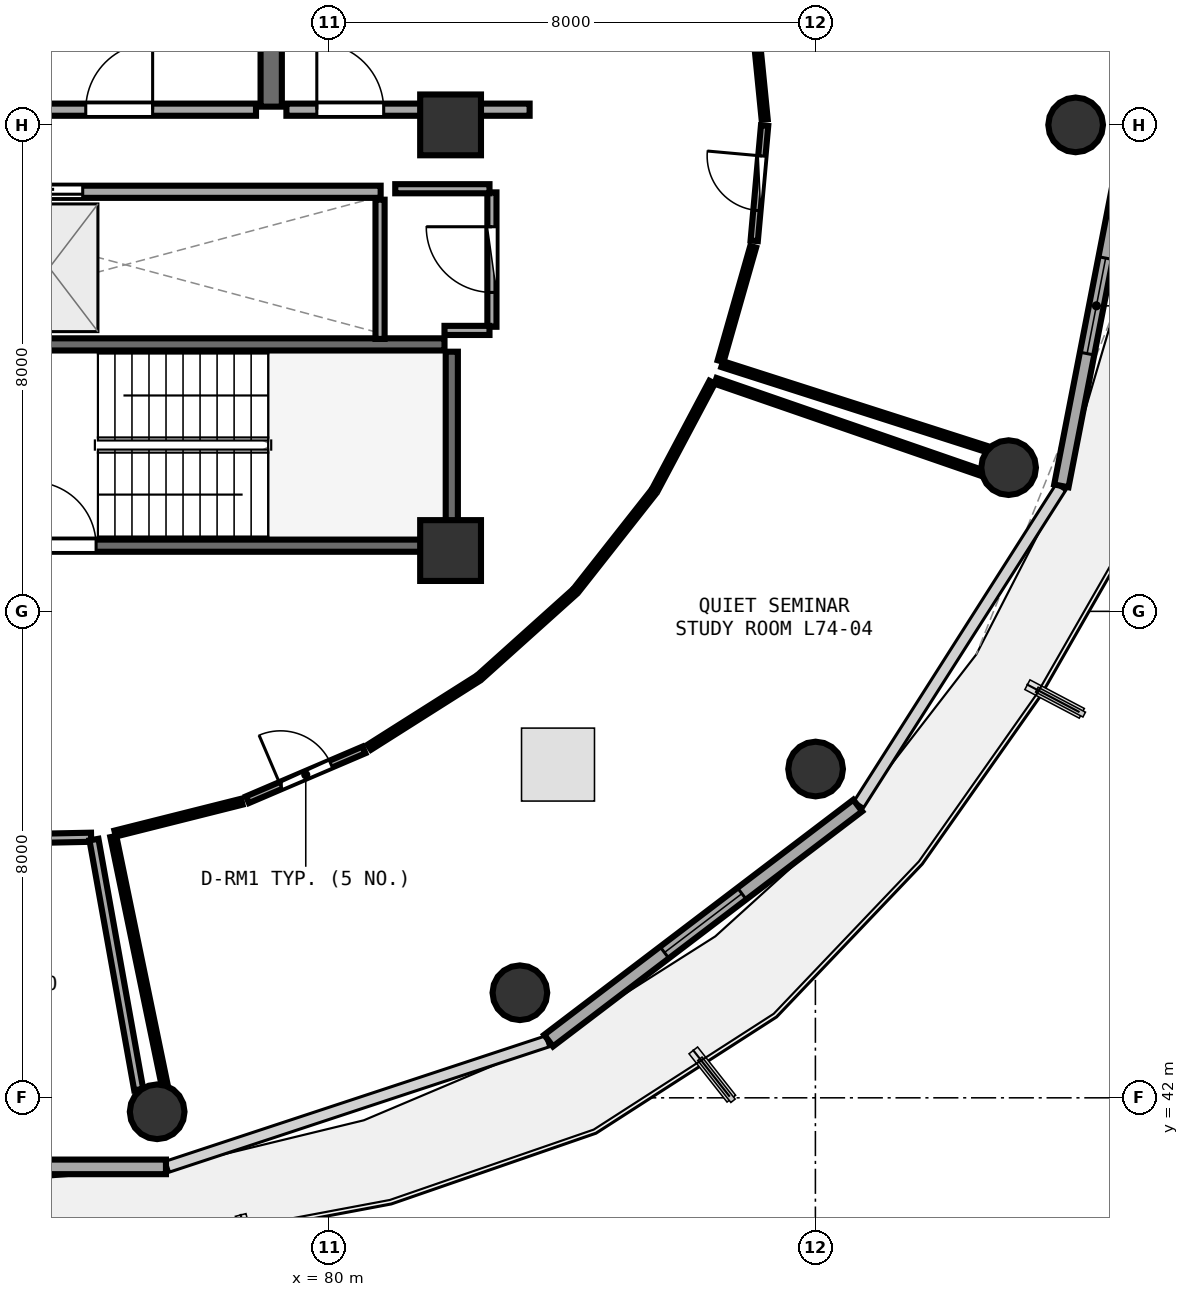
"""IFC4 building model, lengths in metres.
Left out: names, types, materials, properties, quantities, classifications, styles, units other than length and angle.
Written with IfcOpenShell. Run it as: python <this file> out.ifc"""

import sys

from ifc_helpers import new_model, si_unit, direction, frame, frame_2d, origin, origin_2d, place, context, subcontext, project, spatial, rectangle, circle, extrude, element, fill, save


model = new_model("IFC4")
c1 = context("Model", 3, precision=1e-05, world=origin(), true_north=direction((0.0, 1.0)))
c2 = subcontext(c1, "Body", "Model", "MODEL_VIEW")
j1 = project(units=[si_unit("LENGTHUNIT", "METRE"), si_unit("PLANEANGLEUNIT", "RADIAN")], contexts=[c1])
p1 = place(None, origin())
s1 = spatial("IfcSite", under=j1, at=p1, CompositionType="ELEMENT")
p2 = place(p1, origin())
s2 = spatial("IfcBuilding", under=s1, at=p2, CompositionType="ELEMENT")
p3 = place(p2, frame((0.0, 0.0, 289.95)))
s3 = spatial("IfcBuildingStorey", under=s2, at=p3, CompositionType="ELEMENT", Elevation=289.95)
for number, where, z_axis, x_axis in (
    (1, (82.0, 51.0, 0.0), (0.0, 0.0, 1.0), (1.0, 0.0, 0.0)),
    (2, (82.0, 58.0, 0.0), (0.0, 0.0, 1.0), (1.0, 0.0, 0.0)),
):
    element("IfcColumn", number, at=place(p3, frame(where, z_axis=z_axis, x_axis=x_axis)), inside=s3, PredefinedType="PILASTER", context=c2, shape_type="SweptSolid", body=[
        extrude(rectangle(XDim=1.0, YDim=1.0, at=origin_2d()), origin(), (0.0, 0.0, 1.0), 3.75),
    ])
for number, where, z_axis, x_axis in (
    (3, (92.28, 58.0, 0.0), (0.0, 0.0, 1.0), (1.0, 0.0, 0.0)),
    (4, (77.174, 41.771, 0.0), (0.0, 0.0, 1.0), (1.0, 0.0, 0.0)),
    (5, (83.14, 43.728, 0.0), (0.0, 0.0, 1.0), (1.0, 0.0, 0.0)),
    (6, (88.003, 47.407, 0.0), (0.0, 0.0, 1.0), (1.0, 0.0, 0.0)),
    (7, (91.177, 52.364, 0.0), (0.0, 0.0, 1.0), (1.0, 0.0, 0.0)),
):
    element("IfcColumn", number, at=place(p3, frame(where, z_axis=z_axis, x_axis=x_axis)), inside=s3, PredefinedType="COLUMN", context=c2, shape_type="SweptSolid", body=[
        extrude(circle(Radius=0.45, at=origin_2d()), origin(), (0.0, 0.0, 1.0), 3.75),
    ])
p4 = place(p3, frame((70.681, 40.864, 0.0), z_axis=(0.0, 0.0, 1.0), x_axis=(1.0, 0.0, 0.0)))
e8 = element("IfcWall", 8, at=p4, inside=s3, PredefinedType="SOLIDWALL", context=c2, shape_type="SweptSolid", body=[
    extrude(rectangle(XDim=6.638, YDim=0.24, at=frame_2d((3.319, 0.0))), origin(), (0.0, 0.0, 1.0), 3.415),
])
p5 = place(p4, frame((2.519, 0.0, 0.85)))
e9 = element("IfcOpeningElement", 9, at=p5, cuts=e8, PredefinedType="OPENING", context=c2, shape_type="SweptSolid", body=[
    extrude(rectangle(XDim=1.6, YDim=1.45, at=frame_2d((0.8, 0.725))), frame((0.0, 0.13, 0.0), z_axis=(0.0, -1.0, 0.0), x_axis=(1.0, 0.0, 0.0)), (0.0, 0.0, 1.0), 0.26),
])
p6 = place(p3, frame((83.612, 42.94, 0.0), z_axis=(0.0, 0.0, 1.0), x_axis=(0.796010444211, 0.605282886514, 0.0)))
e10 = element("IfcWall", 10, at=p6, inside=s3, PredefinedType="SOLIDWALL", context=c2, shape_type="SweptSolid", body=[
    extrude(rectangle(XDim=6.387, YDim=0.24, at=frame_2d((3.194, 0.0))), origin(), (0.0, 0.0, 1.0), 3.415),
])
p7 = place(p6, frame((2.394, 0.0, 0.85)))
e11 = element("IfcOpeningElement", 11, at=p7, cuts=e10, PredefinedType="OPENING", context=c2, shape_type="SweptSolid", body=[
    extrude(rectangle(XDim=1.6, YDim=1.45, at=frame_2d((0.8, 0.725))), frame((0.0, 0.13, 0.0), z_axis=(0.0, -1.0, 0.0), x_axis=(1.0, 0.0, 0.0)), (0.0, 0.0, 1.0), 0.26),
])
p8 = place(p3, frame((92.045, 52.063, 0.0), z_axis=(0.0, 0.0, 1.0), x_axis=(0.190969309115, 0.981596008028, 0.0)))
e12 = element("IfcWall", 12, at=p8, inside=s3, PredefinedType="SOLIDWALL", context=c2, shape_type="SweptSolid", body=[
    extrude(rectangle(XDim=6.033, YDim=0.24, at=frame_2d((3.017, 0.0))), origin(), (0.0, 0.0, 1.0), 3.415),
])
p9 = place(p8, frame((2.216, 0.0, 0.85)))
e13 = element("IfcOpeningElement", 13, at=p9, cuts=e12, PredefinedType="OPENING", context=c2, shape_type="SweptSolid", body=[
    extrude(rectangle(XDim=1.6, YDim=1.45, at=frame_2d((0.8, 0.725))), frame((0.0, 0.13, 0.0), z_axis=(0.0, -1.0, 0.0), x_axis=(1.0, 0.0, 0.0)), (0.0, 0.0, 1.0), 0.26),
])
p10 = place(p3, frame((74.0, 51.08, 0.0), z_axis=(0.0, 0.0, 1.0), x_axis=(1.0, 0.0, 0.0)))
e14 = element("IfcWall", 14, at=p10, inside=s3, PredefinedType="SHEAR", context=c2, shape_type="SweptSolid", body=[
    extrude(rectangle(XDim=7.9, YDim=0.2, at=frame_2d((3.95, 0.0))), origin(), (0.0, 0.0, 1.0), 3.43),
])
p11 = place(p10, frame((1.12, 0.0, 0.0)))
e15 = element("IfcOpeningElement", 15, at=p11, cuts=e14, PredefinedType="OPENING", context=c2, shape_type="SweptSolid", body=[
    extrude(rectangle(XDim=1.05, YDim=2.1, at=frame_2d((0.525, 1.05))), frame((0.0, 0.11, 0.0), z_axis=(0.0, -1.0, 0.0), x_axis=(1.0, 0.0, 0.0)), (0.0, 0.0, 1.0), 0.22),
])
p12 = place(p3, frame((82.02, 51.2, 0.0), z_axis=(0.0, 0.0, 1.0), x_axis=(0.0, 1.0, 0.0)))
e16 = element("IfcWall", 16, at=p12, inside=s3, PredefinedType="SHEAR", context=c2, shape_type="SweptSolid", body=[
    extrude(rectangle(XDim=3.07, YDim=0.2, at=frame_2d((1.535, 0.0))), origin(), (0.0, 0.0, 1.0), 3.43),
])
p13 = place(p3, frame((81.9, 54.39, 0.0), z_axis=(0.0, 0.0, 1.0), x_axis=(-1.0, 0.0, 0.0)))
e17 = element("IfcWall", 17, at=p13, inside=s3, PredefinedType="SHEAR", context=c2, shape_type="SweptSolid", body=[
    extrude(rectangle(XDim=8.46, YDim=0.2, at=frame_2d((4.23, 0.0))), origin(), (0.0, 0.0, 1.0), 3.43),
])
p14 = place(p3, frame((79.05, 58.3, 0.0), z_axis=(0.0, 0.0, 1.0), x_axis=(0.0, 1.0, 0.0)))
e18 = element("IfcWall", 18, at=p14, inside=s3, PredefinedType="SHEAR", context=c2, shape_type="SweptSolid", body=[
    extrude(rectangle(XDim=6.3, YDim=0.35, at=frame_2d((3.15, 0.0))), origin(), (0.0, 0.0, 1.0), 3.43),
])
p15 = place(p3, frame((74.2, 58.25, 0.0), z_axis=(0.0, 0.0, 1.0), x_axis=(1.0, 0.0, 0.0)))
e19 = element("IfcWall", 19, at=p15, inside=s3, PredefinedType="SOLIDWALL", context=c2, shape_type="SweptSolid", body=[
    extrude(rectangle(XDim=4.6, YDim=0.2, at=frame_2d((2.3, 0.0))), origin(), (0.0, 0.0, 1.0), 3.42),
])
p16 = place(p15, frame((1.8, 0.0, 0.0)))
e20 = element("IfcOpeningElement", 20, at=p16, cuts=e19, PredefinedType="OPENING", context=c2, shape_type="SweptSolid", body=[
    extrude(rectangle(XDim=1.1, YDim=2.1, at=frame_2d((0.55, 1.05))), frame((0.0, 0.11, 0.0), z_axis=(0.0, -1.0, 0.0), x_axis=(1.0, 0.0, 0.0)), (0.0, 0.0, 1.0), 0.22),
])
p17 = place(p3, frame((79.3, 58.25, 0.0), z_axis=(0.0, 0.0, 1.0), x_axis=(1.0, 0.0, 0.0)))
e21 = element("IfcWall", 21, at=p17, inside=s3, PredefinedType="SOLIDWALL", context=c2, shape_type="SweptSolid", body=[
    extrude(rectangle(XDim=4.0, YDim=0.2, at=frame_2d((2.0, 0.0))), origin(), (0.0, 0.0, 1.0), 2.715),
])
p18 = place(p17, frame((0.5, 0.0, 0.0)))
e22 = element("IfcOpeningElement", 22, at=p18, cuts=e21, PredefinedType="OPENING", context=c2, shape_type="SweptSolid", body=[
    extrude(rectangle(XDim=1.1, YDim=2.1, at=frame_2d((0.55, 1.05))), frame((0.0, 0.11, 0.0), z_axis=(0.0, -1.0, 0.0), x_axis=(1.0, 0.0, 0.0)), (0.0, 0.0, 1.0), 0.22),
])
p19 = place(p3, frame((72.45, 56.9, 0.0), z_axis=(0.0, 0.0, 1.0), x_axis=(1.0, 0.0, 0.0)))
e23 = element("IfcWall", 23, at=p19, inside=s3, PredefinedType="SOLIDWALL", context=c2, shape_type="SweptSolid", body=[
    extrude(rectangle(XDim=8.4, YDim=0.2, at=frame_2d((4.2, 0.0))), origin(), (0.0, 0.0, 1.0), 3.42),
])
p20 = place(p19, frame((0.4, 0.0, 0.0)))
e24 = element("IfcOpeningElement", 24, at=p20, cuts=e23, PredefinedType="OPENING", context=c2, shape_type="SweptSolid", body=[
    extrude(rectangle(XDim=1.1, YDim=2.1, at=frame_2d((0.55, 1.05))), frame((0.0, 0.11, 0.0), z_axis=(0.0, -1.0, 0.0), x_axis=(1.0, 0.0, 0.0)), (0.0, 0.0, 1.0), 0.22),
])
p21 = place(p19, frame((2.4, 0.0, 0.0)))
e25 = element("IfcOpeningElement", 25, at=p21, cuts=e23, PredefinedType="OPENING", context=c2, shape_type="SweptSolid", body=[
    extrude(rectangle(XDim=1.1, YDim=2.1, at=frame_2d((0.55, 1.05))), frame((0.0, 0.11, 0.0), z_axis=(0.0, -1.0, 0.0), x_axis=(1.0, 0.0, 0.0)), (0.0, 0.0, 1.0), 0.22),
])
p22 = place(p3, frame((80.84, 54.48, 0.0), z_axis=(0.0, 0.0, 1.0), x_axis=(0.0, 1.0, 0.0)))
e26 = element("IfcWall", 26, at=p22, inside=s3, PredefinedType="PARTITIONING", context=c2, shape_type="SweptSolid", body=[
    extrude(rectangle(XDim=2.29, YDim=0.15, at=frame_2d((1.145, 0.0))), origin(), (0.0, 0.0, 1.0), 3.42),
])
p23 = place(p3, frame((82.68, 54.68, 0.0), z_axis=(0.0, 0.0, 1.0), x_axis=(0.0, 1.0, 0.0)))
e27 = element("IfcWall", 27, at=p23, inside=s3, PredefinedType="PARTITIONING", context=c2, shape_type="SweptSolid", body=[
    extrude(rectangle(XDim=2.21, YDim=0.15, at=frame_2d((1.105, 0.0))), origin(), (0.0, 0.0, 1.0), 3.42),
])
p24 = place(p23, frame((0.565, 0.0, 0.0)))
e28 = element("IfcOpeningElement", 28, at=p24, cuts=e27, PredefinedType="OPENING", context=c2, shape_type="SweptSolid", body=[
    extrude(rectangle(XDim=1.08, YDim=2.1, at=frame_2d((0.54, 1.05))), frame((0.0, 0.085, 0.0), z_axis=(0.0, -1.0, 0.0), x_axis=(1.0, 0.0, 0.0)), (0.0, 0.0, 1.0), 0.17),
])
p25 = place(p3, frame((78.66, 46.903, 0.0), z_axis=(0.0, 0.0, 1.0), x_axis=(0.919508345424, 0.39307048057, 0.0)))
e29 = element("IfcWall", 29, at=p25, inside=s3, PredefinedType="PARTITIONING", context=c2, shape_type="SweptSolid", body=[
    extrude(rectangle(XDim=2.083, YDim=0.12, at=frame_2d((1.042, 0.0))), origin(), (0.0, 0.0, 1.0), 3.42),
])
p26 = place(p25, frame((0.592, 0.0, 0.0)))
e30 = element("IfcOpeningElement", 30, at=p26, cuts=e29, PredefinedType="OPENING", context=c2, shape_type="SweptSolid", body=[
    extrude(rectangle(XDim=0.9, YDim=2.08, at=frame_2d((0.45, 1.04))), frame((0.0, 0.07, 0.0), z_axis=(0.0, -1.0, 0.0), x_axis=(1.0, 0.0, 0.0)), (0.0, 0.0, 1.0), 0.14),
])
p27 = place(p3, frame((86.993, 56.094, 0.0), z_axis=(0.0, 0.0, 1.0), x_axis=(0.089968706127, 0.995944592795, 0.0)))
e31 = element("IfcWall", 31, at=p27, inside=s3, PredefinedType="PARTITIONING", context=c2, shape_type="SweptSolid", body=[
    extrude(rectangle(XDim=1.902, YDim=0.12, at=frame_2d((0.951, 0.0))), origin(), (0.0, 0.0, 1.0), 3.015),
])
p28 = place(p27, frame((0.501, 0.0, 0.0)))
e32 = element("IfcOpeningElement", 32, at=p28, cuts=e31, PredefinedType="OPENING", context=c2, shape_type="SweptSolid", body=[
    extrude(rectangle(XDim=0.9, YDim=2.08, at=frame_2d((0.45, 1.04))), frame((0.0, 0.07, 0.0), z_axis=(0.0, -1.0, 0.0), x_axis=(1.0, 0.0, 0.0)), (0.0, 0.0, 1.0), 0.14),
])
p29 = place(p3, frame((81.9, 54.62, 0.0), z_axis=(0.0, 0.0, 1.0), x_axis=(1.0, 0.0, 0.0)))
e33 = element("IfcWall", 33, at=p29, inside=s3, PredefinedType="PARTITIONING", context=c2, shape_type="SweptSolid", body=[
    extrude(rectangle(XDim=0.74, YDim=0.15, at=frame_2d((0.37, 0.0))), origin(), (0.0, 0.0, 1.0), 2.715),
])
p30 = place(p3, frame((82.64, 56.95, 0.0), z_axis=(0.0, 0.0, 1.0), x_axis=(-1.0, 0.0, 0.0)))
e34 = element("IfcWall", 34, at=p30, inside=s3, PredefinedType="PARTITIONING", context=c2, shape_type="SweptSolid", body=[
    extrude(rectangle(XDim=1.55, YDim=0.15, at=frame_2d((0.775, 0.0))), origin(), (0.0, 0.0, 1.0), 2.715),
])
p31 = place(p3, frame((72.507, 46.212, 0.0), z_axis=(0.0, 0.0, 1.0), x_axis=(0.999790880908, 0.02044980325, 0.0)))
e35 = element("IfcWall", 35, at=p31, inside=s3, PredefinedType="PARTITIONING", context=c2, shape_type="SweptSolid", body=[
    extrude(rectangle(XDim=3.582, YDim=0.15, at=frame_2d((1.791, 0.0))), origin(), (0.0, 0.0, 1.0), 3.015),
])
p32 = place(p3, frame((76.135, 46.247, 0.0), z_axis=(0.0, 0.0, 1.0), x_axis=(0.176199339585, -0.984354505618, 0.0)))
e36 = element("IfcWall", 36, at=p32, inside=s3, PredefinedType="PARTITIONING", context=c2, shape_type="SweptSolid", body=[
    extrude(rectangle(XDim=4.176, YDim=0.15, at=frame_2d((2.088, 0.0))), origin(), (0.0, 0.0, 1.0), 3.015),
])
p33 = place(p3, frame((76.484, 46.346, 0.0), z_axis=(0.0, 0.0, 1.0), x_axis=(0.969827312174, 0.243792913272, 0.0)))
e37 = element("IfcWall", 37, at=p33, inside=s3, PredefinedType="PARTITIONING", context=c2, shape_type="SweptSolid", body=[
    extrude(rectangle(XDim=2.147, YDim=0.1, at=frame_2d((1.073, 0.0))), origin(), (0.0, 0.0, 1.0), 3.42),
])
p34 = place(p3, frame((80.665, 47.766, 0.0), z_axis=(0.0, 0.0, 1.0), x_axis=(0.844856002064, 0.534993771717, 0.0)))
e38 = element("IfcWall", 38, at=p34, inside=s3, PredefinedType="PARTITIONING", context=c2, shape_type="SweptSolid", body=[
    extrude(rectangle(XDim=2.092, YDim=0.1, at=frame_2d((1.046, 0.0))), origin(), (0.0, 0.0, 1.0), 3.015),
])
p35 = place(p3, frame((82.496, 48.934, 0.0), z_axis=(0.0, 0.0, 1.0), x_axis=(0.743943808924, 0.668242178527, 0.0)))
e39 = element("IfcWall", 39, at=p35, inside=s3, PredefinedType="PARTITIONING", context=c2, shape_type="SweptSolid", body=[
    extrude(rectangle(XDim=2.054, YDim=0.1, at=frame_2d((1.027, 0.0))), origin(), (0.0, 0.0, 1.0), 3.015),
])
p36 = place(p3, frame((84.079, 50.365, 0.0), z_axis=(0.0, 0.0, 1.0), x_axis=(0.618820199788, 0.785532660259, 0.0)))
e40 = element("IfcWall", 40, at=p36, inside=s3, PredefinedType="PARTITIONING", context=c2, shape_type="SweptSolid", body=[
    extrude(rectangle(XDim=2.018, YDim=0.1, at=frame_2d((1.009, 0.0))), origin(), (0.0, 0.0, 1.0), 3.015),
])
p37 = place(p3, frame((85.371, 52.016, 0.0), z_axis=(0.0, 0.0, 1.0), x_axis=(0.468933294906, 0.883233584579, 0.0)))
e41 = element("IfcWall", 41, at=p37, inside=s3, PredefinedType="PARTITIONING", context=c2, shape_type="SweptSolid", body=[
    extrude(rectangle(XDim=1.984, YDim=0.1, at=frame_2d((0.992, 0.0))), origin(), (0.0, 0.0, 1.0), 3.175),
])
p38 = place(p3, frame((86.358, 53.791, 0.0), z_axis=(0.0, 0.0, 1.0), x_axis=(0.945103281494, -0.326771766388, 0.0)))
e42 = element("IfcWall", 42, at=p38, inside=s3, PredefinedType="PARTITIONING", context=c2, shape_type="SweptSolid", body=[
    extrude(rectangle(XDim=4.604, YDim=0.1, at=frame_2d((2.302, 0.0))), origin(), (0.0, 0.0, 1.0), 3.015),
])
p39 = place(p3, frame((77.293, 42.23, 0.0), z_axis=(0.0, 0.0, 1.0), x_axis=(-0.202308141573, 0.979321916355, 0.0)))
e43 = element("IfcWall", 43, at=p39, inside=s3, PredefinedType="PARTITIONING", context=c2, shape_type="SweptSolid", body=[
    extrude(rectangle(XDim=4.153, YDim=0.1, at=frame_2d((2.076, 0.0))), origin(), (0.0, 0.0, 1.0), 3.115),
])
p40 = place(p3, frame((86.441, 54.115, 0.0), z_axis=(0.0, 0.0, 1.0), x_axis=(0.274226302341, 0.961665188673, 0.0)))
e44 = element("IfcWall", 44, at=p40, inside=s3, PredefinedType="PARTITIONING", context=c2, shape_type="SweptSolid", body=[
    extrude(rectangle(XDim=1.955, YDim=0.1, at=frame_2d((0.978, 0.0))), origin(), (0.0, 0.0, 1.0), 3.42),
])
p41 = place(p3, frame((87.166, 58.088, 0.0), z_axis=(0.0, 0.0, 1.0), x_axis=(-0.098769631998, 0.995110325439, 0.0)))
e45 = element("IfcWall", 45, at=p41, inside=s3, PredefinedType="PARTITIONING", context=c2, shape_type="SweptSolid", body=[
    extrude(rectangle(XDim=1.943, YDim=0.1, at=frame_2d((0.971, 0.0))), origin(), (0.0, 0.0, 1.0), 3.015),
])
p42 = place(p3, frame((90.816, 52.671, 0.0), z_axis=(0.0, 0.0, 1.0), x_axis=(-0.95227750557, 0.305233602976, 0.0)))
e46 = element("IfcWall", 46, at=p42, inside=s3, PredefinedType="PARTITIONING", context=c2, shape_type="SweptSolid", body=[
    extrude(rectangle(XDim=4.565, YDim=0.1, at=frame_2d((2.283, 0.0))), origin(), (0.0, 0.0, 1.0), 3.115),
])
p43 = place(p7, origin())
e47 = element("IfcWindow", 47, at=p43, inside=s3, PartitioningType="SINGLE_PANEL", PredefinedType="WINDOW", context=c2, shape_type="SweptSolid", body=[
    extrude(rectangle(XDim=1.6, YDim=1.45, at=frame_2d((0.8, 0.725))), frame((0.0, 0.03, 0.0), z_axis=(0.0, -1.0, 0.0), x_axis=(1.0, 0.0, 0.0)), (0.0, 0.0, 1.0), 0.06),
])
fill(e11, e47)
p44 = place(p9, origin())
e48 = element("IfcWindow", 48, at=p44, inside=s3, PartitioningType="SINGLE_PANEL", PredefinedType="WINDOW", context=c2, shape_type="SweptSolid", body=[
    extrude(rectangle(XDim=1.6, YDim=1.45, at=frame_2d((0.8, 0.725))), frame((0.0, 0.03, 0.0), z_axis=(0.0, -1.0, 0.0), x_axis=(1.0, 0.0, 0.0)), (0.0, 0.0, 1.0), 0.06),
])
fill(e13, e48)
p45 = place(p11, origin())
e49 = element("IfcDoor", 49, at=p45, inside=s3, OperationType="SINGLE_SWING_LEFT", PredefinedType="DOOR", context=c2, shape_type="SweptSolid", body=[
    extrude(rectangle(XDim=1.05, YDim=2.1, at=frame_2d((0.525, 1.05))), frame((0.0, 0.025, 0.0), z_axis=(0.0, -1.0, 0.0), x_axis=(1.0, 0.0, 0.0)), (0.0, 0.0, 1.0), 0.05),
])
fill(e15, e49)
p46 = place(p16, frame((1.1, 0.0, 0.0), z_axis=(0.0, 0.0, 1.0), x_axis=(-1.0, 0.0, 0.0)))
e50 = element("IfcDoor", 50, at=p46, inside=s3, OperationType="SINGLE_SWING_LEFT", PredefinedType="DOOR", context=c2, shape_type="SweptSolid", body=[
    extrude(rectangle(XDim=1.1, YDim=2.1, at=frame_2d((0.55, 1.05))), frame((0.0, 0.025, 0.0), z_axis=(0.0, -1.0, 0.0), x_axis=(1.0, 0.0, 0.0)), (0.0, 0.0, 1.0), 0.05),
])
fill(e20, e50)
p47 = place(p18, frame((1.1, 0.0, 0.0), z_axis=(0.0, 0.0, 1.0), x_axis=(-1.0, 0.0, 0.0)))
e51 = element("IfcDoor", 51, at=p47, inside=s3, OperationType="SINGLE_SWING_RIGHT", PredefinedType="DOOR", context=c2, shape_type="SweptSolid", body=[
    extrude(rectangle(XDim=1.1, YDim=2.1, at=frame_2d((0.55, 1.05))), frame((0.0, 0.025, 0.0), z_axis=(0.0, -1.0, 0.0), x_axis=(1.0, 0.0, 0.0)), (0.0, 0.0, 1.0), 0.05),
])
fill(e22, e51)
p48 = place(p21, origin())
e52 = element("IfcDoor", 52, at=p48, inside=s3, OperationType="DOUBLE_DOOR_SLIDING", PredefinedType="DOOR", context=c2, shape_type="SweptSolid", body=[
    extrude(rectangle(XDim=1.1, YDim=2.1, at=frame_2d((0.55, 1.05))), frame((0.0, 0.025, 0.0), z_axis=(0.0, -1.0, 0.0), x_axis=(1.0, 0.0, 0.0)), (0.0, 0.0, 1.0), 0.05),
])
fill(e25, e52)
p49 = place(p24, origin())
e53 = element("IfcDoor", 53, at=p49, inside=s3, OperationType="SINGLE_SWING_RIGHT", PredefinedType="DOOR", context=c2, shape_type="SweptSolid", body=[
    extrude(rectangle(XDim=1.08, YDim=2.1, at=frame_2d((0.54, 1.05))), frame((0.0, 0.025, 0.0), z_axis=(0.0, -1.0, 0.0), x_axis=(1.0, 0.0, 0.0)), (0.0, 0.0, 1.0), 0.05),
])
fill(e28, e53)
p50 = place(p26, origin())
e54 = element("IfcDoor", 54, at=p50, inside=s3, OperationType="SINGLE_SWING_LEFT", PredefinedType="DOOR", context=c2, shape_type="SweptSolid", body=[
    extrude(rectangle(XDim=0.9, YDim=2.08, at=frame_2d((0.45, 1.04))), frame((0.0, 0.025, 0.0), z_axis=(0.0, -1.0, 0.0), x_axis=(1.0, 0.0, 0.0)), (0.0, 0.0, 1.0), 0.05),
])
fill(e30, e54)
p51 = place(p28, origin())
e55 = element("IfcDoor", 55, at=p51, inside=s3, OperationType="SINGLE_SWING_RIGHT", PredefinedType="DOOR", context=c2, shape_type="SweptSolid", body=[
    extrude(rectangle(XDim=0.9, YDim=2.08, at=frame_2d((0.45, 1.04))), frame((0.0, 0.025, 0.0), z_axis=(0.0, -1.0, 0.0), x_axis=(1.0, 0.0, 0.0)), (0.0, 0.0, 1.0), 0.05),
])
fill(e32, e55)
save(model, sys.argv[1])
